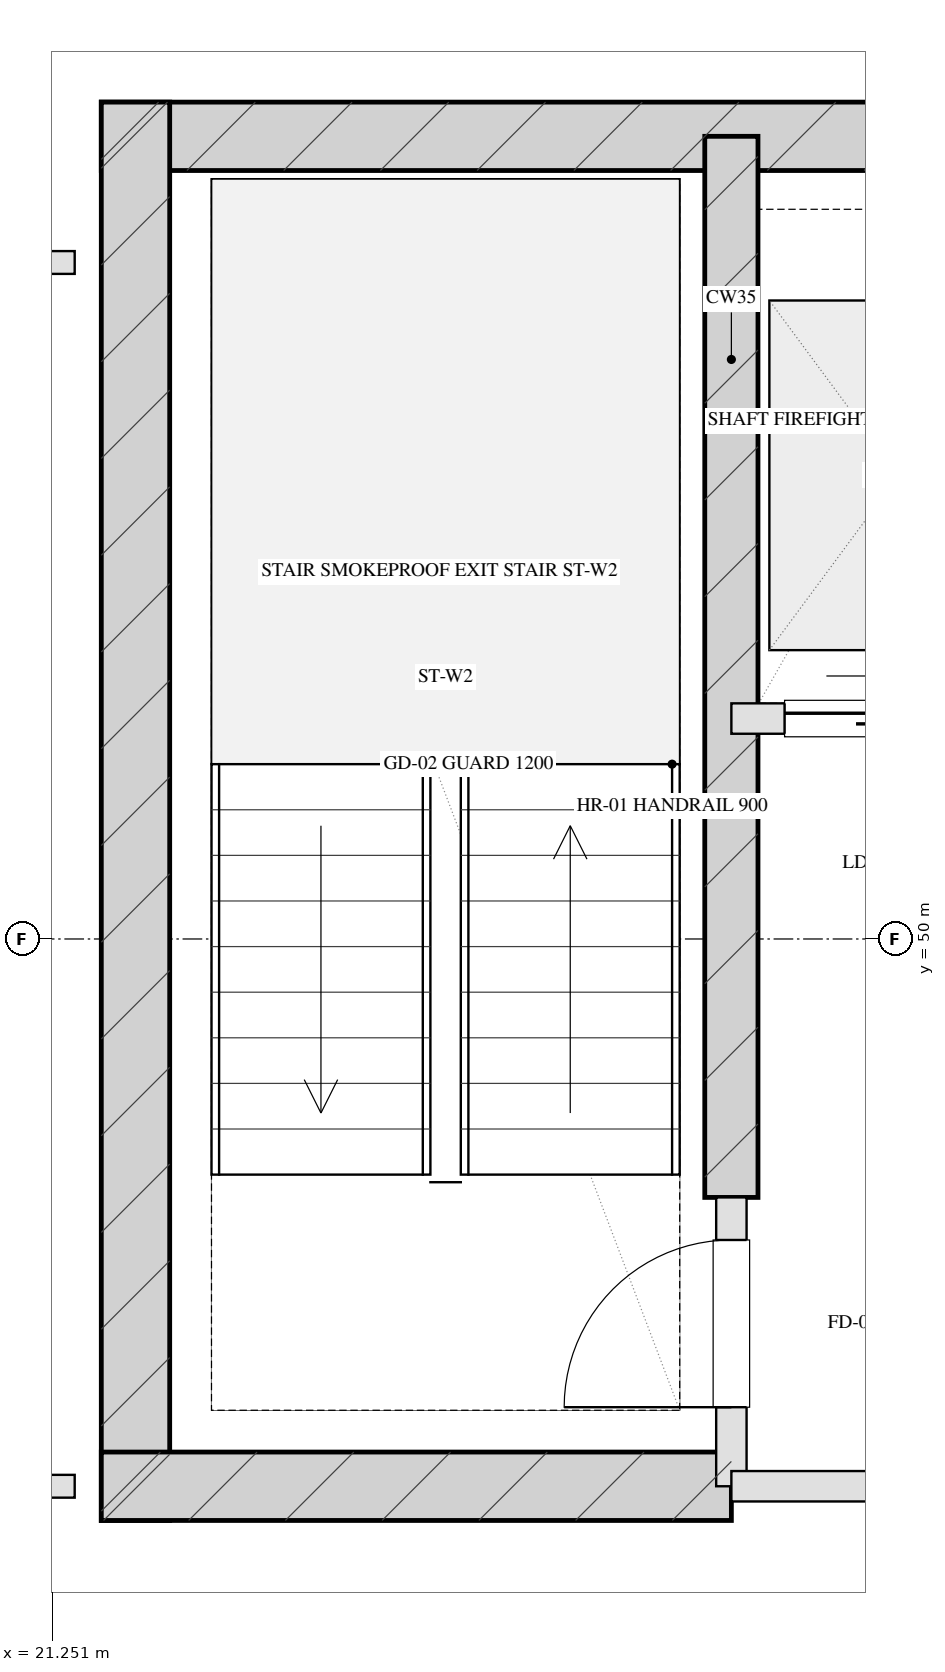
"""IFC4 building model, lengths in metres.
Left out: names, types, materials, properties, quantities, classifications, styles, units other than length and angle.
Written with IfcOpenShell. Run it as: python <this file> out.ifc"""

import sys

from ifc_helpers import new_model, si_unit, direction, frame, frame_2d, origin, place, context, subcontext, project, spatial, rectangle, extrude, element, fill, save


model = new_model("IFC4")
c1 = context("Model", 3, precision=1e-05, world=origin(), true_north=direction((0.0, 1.0)))
c2 = subcontext(c1, "Body", "Model", "MODEL_VIEW")
j1 = project(units=[si_unit("LENGTHUNIT", "METRE"), si_unit("PLANEANGLEUNIT", "RADIAN")], contexts=[c1])
p1 = place(None, origin())
s1 = spatial("IfcSite", under=j1, at=p1, CompositionType="ELEMENT")
p2 = place(p1, origin())
s2 = spatial("IfcBuilding", under=s1, at=p2, CompositionType="ELEMENT")
p3 = place(p2, frame((0.0, 0.0, 223.1)))
s3 = spatial("IfcBuildingStorey", under=s2, at=p3, CompositionType="ELEMENT", Elevation=223.1)
p4 = place(p3, frame((21.575, 55.28, 0.0), z_axis=(0.0, 0.0, 1.0), x_axis=(1.0, 0.0, 0.0)))
e1 = element("IfcWall", 1, at=p4, inside=s3, PredefinedType="SHEAR", context=c2, shape_type="SweptSolid", body=[
    extrude(rectangle(XDim=16.85, YDim=0.45, at=frame_2d((8.425, 0.0))), origin(), (0.0, 0.0, 1.0), 3.45),
])
p5 = place(p3, frame((21.8, 46.175, 0.0), z_axis=(0.0, 0.0, 1.0), x_axis=(0.0, 1.0, 0.0)))
e2 = element("IfcWall", 2, at=p5, inside=s3, PredefinedType="SHEAR", context=c2, shape_type="SweptSolid", body=[
    extrude(rectangle(XDim=9.33, YDim=0.45, at=frame_2d((4.665, 0.0))), origin(), (0.0, 0.0, 1.0), 3.45),
])
p6 = place(p3, frame((25.72, 48.3, 0.0), z_axis=(0.0, 0.0, 1.0), x_axis=(0.0, 1.0, 0.0)))
e3 = element("IfcWall", 3, at=p6, inside=s3, PredefinedType="SHEAR", context=c2, shape_type="SweptSolid", body=[
    extrude(rectangle(XDim=6.98, YDim=0.35, at=frame_2d((3.49, 0.0))), origin(), (0.0, 0.0, 1.0), 3.45),
])
p7 = place(p3, frame((21.575, 46.4, 0.0), z_axis=(0.0, 0.0, 1.0), x_axis=(1.0, 0.0, 0.0)))
e4 = element("IfcWall", 4, at=p7, inside=s3, PredefinedType="SHEAR", context=c2, shape_type="SweptSolid", body=[
    extrude(rectangle(XDim=4.145, YDim=0.45, at=frame_2d((2.073, 0.0))), origin(), (0.0, 0.0, 1.0), 3.45),
])
p8 = place(p3, frame((25.72, 46.4, 0.0), z_axis=(0.0, 0.0, 1.0), x_axis=(0.0, 1.0, 0.0)))
e5 = element("IfcWall", 5, at=p8, inside=s3, PredefinedType="PARTITIONING", context=c2, shape_type="SweptSolid", body=[
    extrude(rectangle(XDim=1.9, YDim=0.2, at=frame_2d((0.95, 0.0))), origin(), (0.0, 0.0, 1.0), 3.175),
])
p9 = place(p8, frame((0.52, 0.0, 0.0)))
e6 = element("IfcOpeningElement", 6, at=p9, cuts=e5, PredefinedType="OPENING", context=c2, shape_type="SweptSolid", body=[
    extrude(rectangle(XDim=1.1, YDim=2.05, at=frame_2d((0.55, 1.025))), frame((0.0, 0.11, 0.0), z_axis=(0.0, -1.0, 0.0), x_axis=(1.0, 0.0, 0.0)), (0.0, 0.0, 1.0), 0.22),
])
p10 = place(p3, frame((25.72, 46.4, 0.0), z_axis=(0.0, 0.0, 1.0), x_axis=(1.0, 0.0, 0.0)))
e7 = element("IfcWall", 7, at=p10, inside=s3, PredefinedType="PARTITIONING", context=c2, shape_type="SweptSolid", body=[
    extrude(rectangle(XDim=3.83, YDim=0.2, at=frame_2d((1.915, 0.0))), origin(), (0.0, 0.0, 1.0), 3.175),
])
p11 = place(p10, frame((1.35, 0.0, 0.0)))
e8 = element("IfcOpeningElement", 8, at=p11, cuts=e7, PredefinedType="OPENING", context=c2, shape_type="SweptSolid", body=[
    extrude(rectangle(XDim=1.2, YDim=2.05, at=frame_2d((0.6, 1.025))), frame((0.0, 0.11, 0.0), z_axis=(0.0, -1.0, 0.0), x_axis=(1.0, 0.0, 0.0)), (0.0, 0.0, 1.0), 0.22),
])
p12 = place(p3, frame((25.72, 51.45, 0.0), z_axis=(0.0, 0.0, 1.0), x_axis=(1.0, 0.0, 0.0)))
e9 = element("IfcWall", 9, at=p12, inside=s3, PredefinedType="PARTITIONING", context=c2, shape_type="SweptSolid", body=[
    extrude(rectangle(XDim=2.1, YDim=0.2, at=frame_2d((1.05, 0.0))), origin(), (0.0, 0.0, 1.0), 3.175),
])
p13 = place(p12, frame((0.35, 0.0, 0.0)))
e10 = element("IfcOpeningElement", 10, at=p13, cuts=e9, PredefinedType="OPENING", context=c2, shape_type="SweptSolid", body=[
    extrude(rectangle(XDim=1.1, YDim=2.05, at=frame_2d((0.55, 1.025))), frame((0.0, 0.11, 0.0), z_axis=(0.0, -1.0, 0.0), x_axis=(1.0, 0.0, 0.0)), (0.0, 0.0, 1.0), 0.22),
])
p14 = place(p3, frame((15.0, 54.45, 0.0), z_axis=(0.0, 0.0, 1.0), x_axis=(1.0, 0.0, 0.0)))
e11 = element("IfcWall", 11, at=p14, inside=s3, PredefinedType="PARTITIONING", context=c2, shape_type="SweptSolid", body=[
    extrude(rectangle(XDim=6.4, YDim=0.15, at=frame_2d((3.2, 0.0))), origin(), (0.0, 0.0, 1.0), 3.175),
])
p15 = place(p3, frame((15.0, 46.4, 0.0), z_axis=(0.0, 0.0, 1.0), x_axis=(1.0, 0.0, 0.0)))
e12 = element("IfcWall", 12, at=p15, inside=s3, PredefinedType="PARTITIONING", context=c2, shape_type="SweptSolid", body=[
    extrude(rectangle(XDim=6.4, YDim=0.15, at=frame_2d((3.2, 0.0))), origin(), (0.0, 0.0, 1.0), 3.175),
])
p16 = place(p15, frame((2.688, 0.0, 0.0)))
e13 = element("IfcOpeningElement", 13, at=p16, cuts=e12, PredefinedType="OPENING", context=c2, shape_type="SweptSolid", body=[
    extrude(rectangle(XDim=0.85, YDim=2.05, at=frame_2d((0.425, 1.025))), frame((0.0, 0.085, 0.0), z_axis=(0.0, -1.0, 0.0), x_axis=(1.0, 0.0, 0.0)), (0.0, 0.0, 1.0), 0.17),
])
p17 = place(p9, origin())
e14 = element("IfcDoor", 14, at=p17, inside=s3, OperationType="SINGLE_SWING_LEFT", PredefinedType="DOOR", context=c2, shape_type="SweptSolid", body=[
    extrude(rectangle(XDim=1.1, YDim=2.05, at=frame_2d((0.55, 1.025))), frame((0.0, 0.025, 0.0), z_axis=(0.0, -1.0, 0.0), x_axis=(1.0, 0.0, 0.0)), (0.0, 0.0, 1.0), 0.05),
])
fill(e6, e14)
p18 = place(p13, origin())
e15 = element("IfcDoor", 15, at=p18, inside=s3, OperationType="DOUBLE_DOOR_SLIDING", PredefinedType="DOOR", context=c2, shape_type="SweptSolid", body=[
    extrude(rectangle(XDim=1.1, YDim=2.05, at=frame_2d((0.55, 1.025))), frame((0.0, 0.025, 0.0), z_axis=(0.0, -1.0, 0.0), x_axis=(1.0, 0.0, 0.0)), (0.0, 0.0, 1.0), 0.05),
])
fill(e10, e15)
save(model, sys.argv[1])
